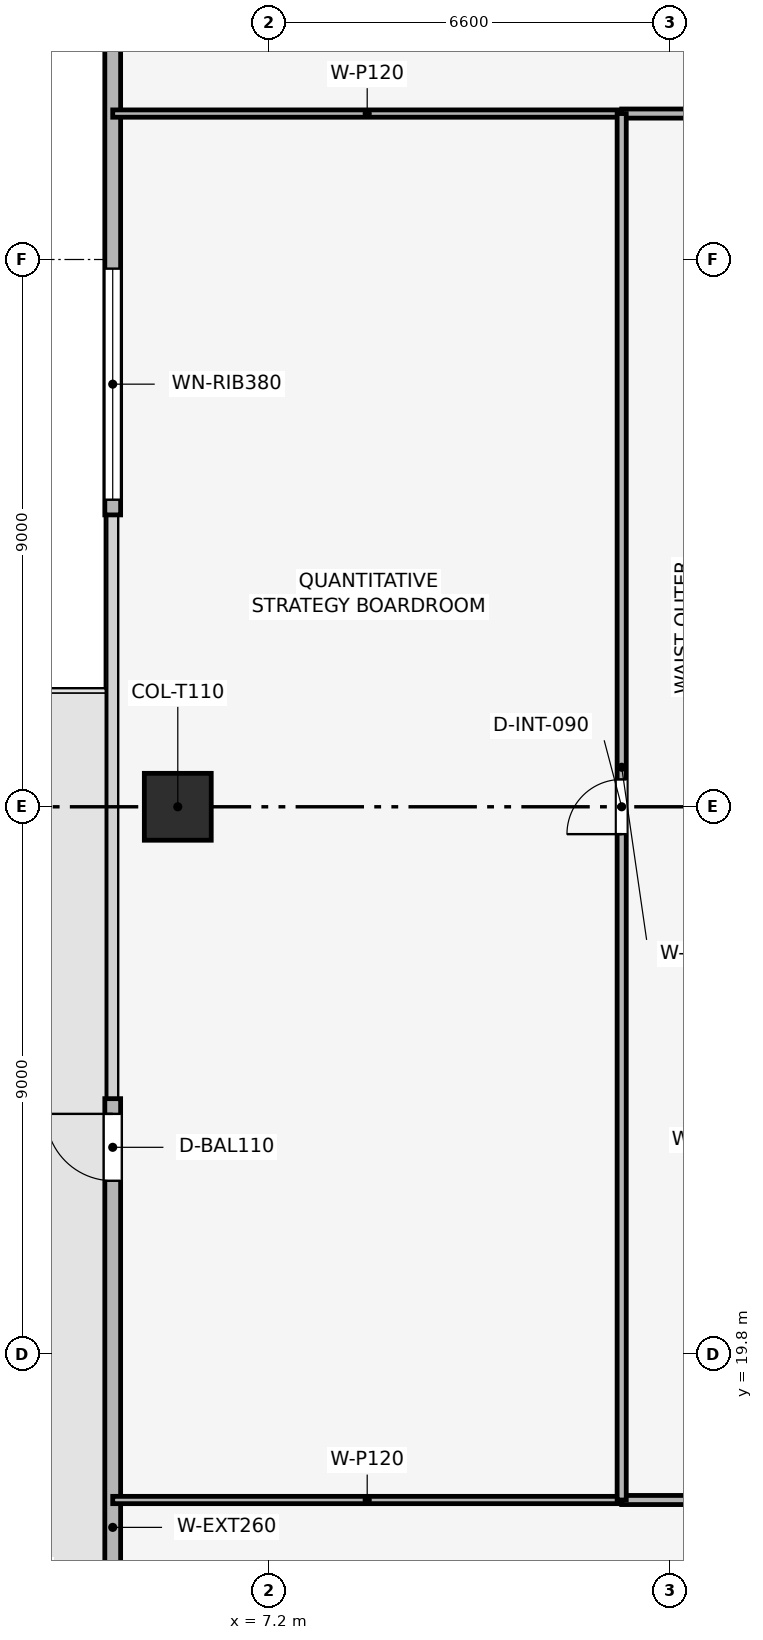
"""IFC4 building model, lengths in metres.
Left out: names, types, materials, properties, quantities, classifications, styles, units other than length and angle.
Written with IfcOpenShell. Run it as: python <this file> out.ifc"""

import sys

from ifc_helpers import new_model, si_unit, direction, frame, frame_2d, origin, origin_2d, place, context, subcontext, project, spatial, rectangle, extrude, element, fill, save


model = new_model("IFC4")
c1 = context("Model", 3, precision=1e-05, world=origin(), true_north=direction((0.0, 1.0)))
c2 = subcontext(c1, "Body", "Model", "MODEL_VIEW")
j1 = project(units=[si_unit("LENGTHUNIT", "METRE"), si_unit("PLANEANGLEUNIT", "RADIAN")], contexts=[c1])
p1 = place(None, origin())
s1 = spatial("IfcSite", under=j1, at=p1, CompositionType="ELEMENT")
p2 = place(p1, origin())
s2 = spatial("IfcBuilding", under=s1, at=p2, CompositionType="ELEMENT")
p3 = place(p2, frame((0.0, 0.0, 157.05)))
s3 = spatial("IfcBuildingStorey", under=s2, at=p3, CompositionType="ELEMENT", Elevation=157.05)
p4 = place(p3, frame((5.7, 28.8, 0.003), z_axis=(0.0, 0.0, 1.0), x_axis=(1.0, 0.0, 0.0)))
e1 = element("IfcColumn", 1, at=p4, inside=s3, PredefinedType="COLUMN", context=c2, shape_type="SweptSolid", body=[
    extrude(rectangle(XDim=1.1, YDim=1.1, at=origin_2d()), origin(), (0.0, 0.0, 1.0), 3.489),
])
p5 = place(p3, frame((4.63, 11.4, 0.0), z_axis=(0.0, 0.0, 1.0), x_axis=(0.0, 1.0, 0.0)))
e2 = element("IfcWall", 2, at=p5, inside=s3, PredefinedType="SOLIDWALL", context=c2, shape_type="SweptSolid", body=[
    extrude(rectangle(XDim=12.6, YDim=0.26, at=frame_2d((6.3, 0.0))), origin(), (0.0, 0.0, 1.0), 3.495),
])
p6 = place(p5, frame((11.25, 0.0, 0.0)))
e3 = element("IfcOpeningElement", 3, at=p6, cuts=e2, PredefinedType="OPENING", context=c2, shape_type="SweptSolid", body=[
    extrude(rectangle(XDim=1.1, YDim=2.2, at=frame_2d((0.55, 1.1))), frame((0.0, 0.14, 0.0), z_axis=(0.0, -1.0, 0.0), x_axis=(1.0, 0.0, 0.0)), (0.0, 0.0, 1.0), 0.28),
])
p7 = place(p3, frame((4.63, 33.6, 0.0), z_axis=(0.0, 0.0, 1.0), x_axis=(0.0, 1.0, 0.0)))
e4 = element("IfcWall", 4, at=p7, inside=s3, PredefinedType="SOLIDWALL", context=c2, shape_type="SweptSolid", body=[
    extrude(rectangle(XDim=12.6, YDim=0.26, at=frame_2d((6.3, 0.0))), origin(), (0.0, 0.0, 1.0), 3.495),
])
p8 = place(p7, frame((0.25, 0.0, 0.9)))
e5 = element("IfcOpeningElement", 5, at=p8, cuts=e4, PredefinedType="OPENING", context=c2, shape_type="SweptSolid", body=[
    extrude(rectangle(XDim=3.8, YDim=1.9, at=frame_2d((1.9, 0.95))), frame((0.0, 0.14, 0.0), z_axis=(0.0, -1.0, 0.0), x_axis=(1.0, 0.0, 0.0)), (0.0, 0.0, 1.0), 0.28),
])
for number, where, z_axis, x_axis in (
    (6, (4.63, 17.4, 0.0), (0.0, 0.0, 1.0), (1.0, 0.0, 0.0)),
    (7, (4.63, 40.2, 0.0), (0.0, 0.0, 1.0), (1.0, 0.0, 0.0)),
):
    element("IfcWall", number, at=place(p3, frame(where, z_axis=z_axis, x_axis=x_axis)), inside=s3, PredefinedType="PARTITIONING", context=c2, shape_type="SweptSolid", body=[
        extrude(rectangle(XDim=8.37, YDim=0.12, at=frame_2d((4.185, 0.0))), origin(), (0.0, 0.0, 1.0), 2.98),
    ])
p9 = place(p3, frame((13.0, 17.4, 0.0), z_axis=(0.0, 0.0, 1.0), x_axis=(1.0, 0.0, 0.0)))
e8 = element("IfcWall", 8, at=p9, inside=s3, PredefinedType="PARTITIONING", context=c2, shape_type="SweptSolid", body=[
    extrude(rectangle(XDim=31.6, YDim=0.15, at=frame_2d((15.8, 0.0))), origin(), (0.0, 0.0, 1.0), 3.03),
])
p10 = place(p9, frame((15.35, 0.0, 0.0)))
e9 = element("IfcOpeningElement", 9, at=p10, cuts=e8, PredefinedType="OPENING", context=c2, shape_type="SweptSolid", body=[
    extrude(rectangle(XDim=0.9, YDim=2.1, at=frame_2d((0.45, 1.05))), frame((0.0, 0.085, 0.0), z_axis=(0.0, -1.0, 0.0), x_axis=(1.0, 0.0, 0.0)), (0.0, 0.0, 1.0), 0.17),
])
p11 = place(p3, frame((13.0, 40.2, 0.0), z_axis=(0.0, 0.0, 1.0), x_axis=(1.0, 0.0, 0.0)))
e10 = element("IfcWall", 10, at=p11, inside=s3, PredefinedType="PARTITIONING", context=c2, shape_type="SweptSolid", body=[
    extrude(rectangle(XDim=31.6, YDim=0.15, at=frame_2d((15.8, 0.0))), origin(), (0.0, 0.0, 1.0), 3.03),
])
p12 = place(p11, frame((6.775, 0.0, 0.0)))
e11 = element("IfcOpeningElement", 11, at=p12, cuts=e10, PredefinedType="OPENING", context=c2, shape_type="SweptSolid", body=[
    extrude(rectangle(XDim=0.9, YDim=2.1, at=frame_2d((0.45, 1.05))), frame((0.0, 0.085, 0.0), z_axis=(0.0, -1.0, 0.0), x_axis=(1.0, 0.0, 0.0)), (0.0, 0.0, 1.0), 0.17),
])
p13 = place(p11, frame((22.575, 0.0, 0.0)))
e12 = element("IfcOpeningElement", 12, at=p13, cuts=e10, PredefinedType="OPENING", context=c2, shape_type="SweptSolid", body=[
    extrude(rectangle(XDim=0.9, YDim=2.1, at=frame_2d((0.45, 1.05))), frame((0.0, 0.085, 0.0), z_axis=(0.0, -1.0, 0.0), x_axis=(1.0, 0.0, 0.0)), (0.0, 0.0, 1.0), 0.17),
])
p14 = place(p3, frame((13.0, 17.4, 0.0), z_axis=(0.0, 0.0, 1.0), x_axis=(0.0, 1.0, 0.0)))
e13 = element("IfcWall", 13, at=p14, inside=s3, PredefinedType="PARTITIONING", context=c2, shape_type="SweptSolid", body=[
    extrude(rectangle(XDim=22.8, YDim=0.15, at=frame_2d((11.4, 0.0))), origin(), (0.0, 0.0, 1.0), 3.03),
])
p15 = place(p14, frame((10.95, 0.0, 0.0)))
e14 = element("IfcOpeningElement", 14, at=p15, cuts=e13, PredefinedType="OPENING", context=c2, shape_type="SweptSolid", body=[
    extrude(rectangle(XDim=0.9, YDim=2.1, at=frame_2d((0.45, 1.05))), frame((0.0, 0.085, 0.0), z_axis=(0.0, -1.0, 0.0), x_axis=(1.0, 0.0, 0.0)), (0.0, 0.0, 1.0), 0.17),
])
p16 = place(p6, origin())
e15 = element("IfcDoor", 15, at=p16, inside=s3, OperationType="SINGLE_SWING_RIGHT", PredefinedType="DOOR", context=c2, shape_type="SweptSolid", body=[
    extrude(rectangle(XDim=1.1, YDim=2.2, at=frame_2d((0.55, 1.1))), frame((0.0, 0.025, 0.0), z_axis=(0.0, -1.0, 0.0), x_axis=(1.0, 0.0, 0.0)), (0.0, 0.0, 1.0), 0.05),
])
fill(e3, e15)
p17 = place(p8, origin())
e16 = element("IfcWindow", 16, at=p17, inside=s3, PartitioningType="SINGLE_PANEL", PredefinedType="WINDOW", context=c2, shape_type="SweptSolid", body=[
    extrude(rectangle(XDim=3.8, YDim=1.9, at=frame_2d((1.9, 0.95))), frame((0.0, 0.03, 0.0), z_axis=(0.0, -1.0, 0.0), x_axis=(1.0, 0.0, 0.0)), (0.0, 0.0, 1.0), 0.06),
])
fill(e5, e16)
p18 = place(p15, origin())
e17 = element("IfcDoor", 17, at=p18, inside=s3, OperationType="SINGLE_SWING_LEFT", PredefinedType="DOOR", context=c2, shape_type="SweptSolid", body=[
    extrude(rectangle(XDim=0.9, YDim=2.1, at=frame_2d((0.45, 1.05))), frame((0.0, 0.025, 0.0), z_axis=(0.0, -1.0, 0.0), x_axis=(1.0, 0.0, 0.0)), (0.0, 0.0, 1.0), 0.05),
])
fill(e14, e17)
save(model, sys.argv[1])
